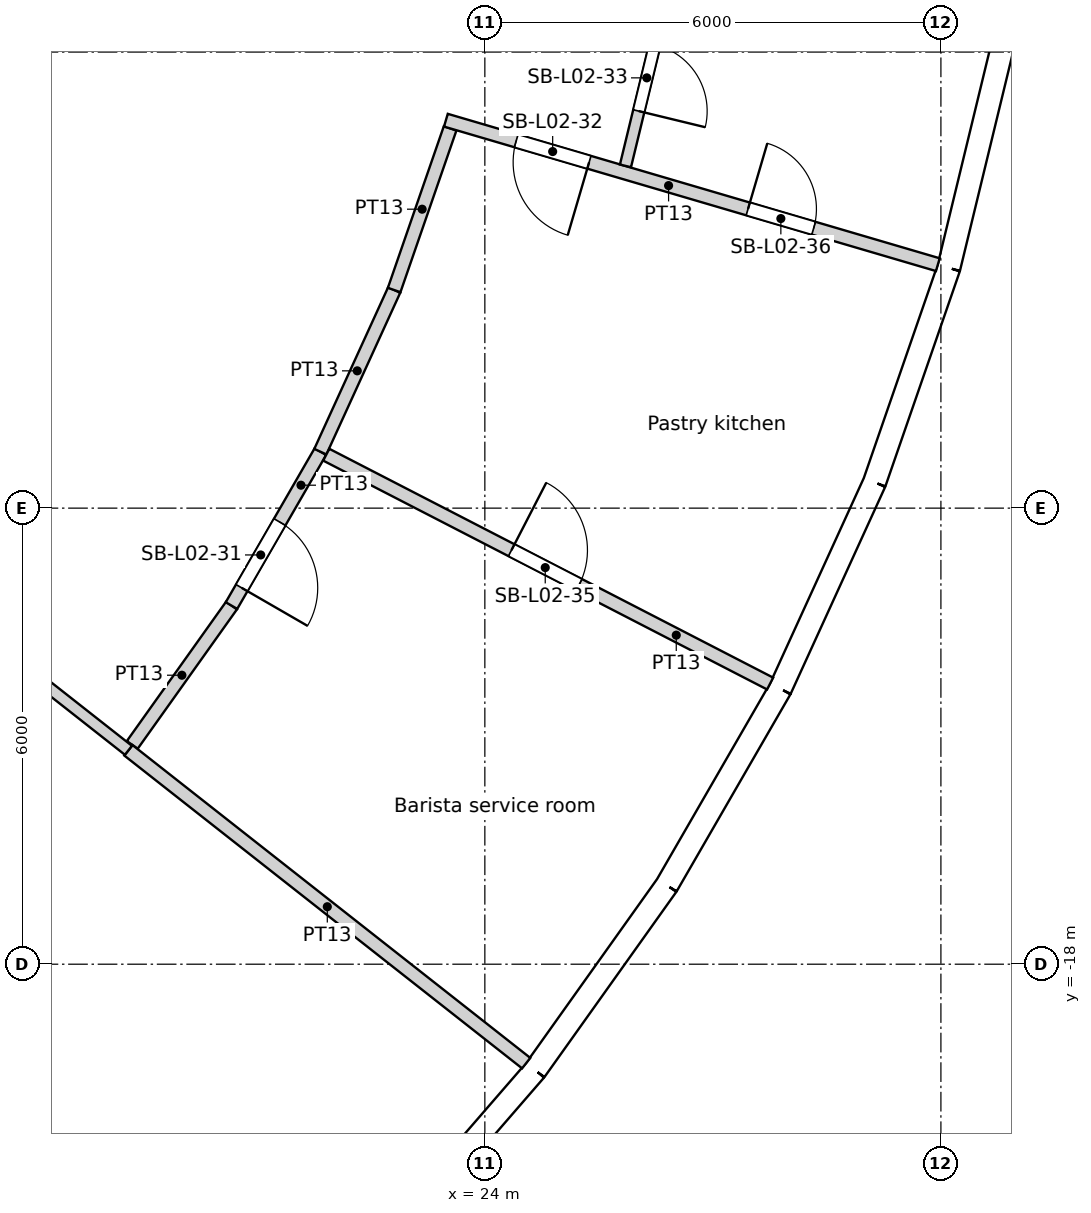
"""IFC4 building model, lengths in metres.
Left out: names, types, materials, properties, quantities, classifications, styles, units other than length and angle.
Written with IfcOpenShell. Run it as: python <this file> out.ifc"""

import sys

from ifc_helpers import new_model, si_unit, direction, frame, frame_2d, origin, origin_2d, place, context, subcontext, project, spatial, rectangle, circle, extrude, element, fill, save


model = new_model("IFC4")
c1 = context("Model", 3, precision=1e-05, world=origin(), true_north=direction((0.0, 1.0)))
c2 = subcontext(c1, "Body", "Model", "MODEL_VIEW")
j1 = project(units=[si_unit("LENGTHUNIT", "METRE"), si_unit("PLANEANGLEUNIT", "RADIAN")], contexts=[c1])
p1 = place(None, origin())
s1 = spatial("IfcSite", under=j1, at=p1, CompositionType="ELEMENT")
p2 = place(p1, origin())
s2 = spatial("IfcBuilding", under=s1, at=p2, CompositionType="ELEMENT")
p3 = place(p2, frame((0.0, 0.0, 13.8)))
s3 = spatial("IfcBuildingStorey", under=s2, at=p3, CompositionType="ELEMENT", Elevation=13.8)
for number, where, z_axis, x_axis in (
    (1, (21.911, -20.892, 0.0), (0.0, 0.0, 1.0), (1.0, 0.0, 0.0)),
    (2, (25.469, -16.368, 0.0), (0.0, 0.0, 1.0), (1.0, 0.0, 0.0)),
    (3, (28.106, -11.252, 0.0), (0.0, 0.0, 1.0), (1.0, 0.0, 0.0)),
    (4, (29.728, -5.729, 0.0), (0.0, 0.0, 1.0), (1.0, 0.0, 0.0)),
):
    element("IfcColumn", number, at=place(p3, frame(where, z_axis=z_axis, x_axis=x_axis)), inside=s3, PredefinedType="COLUMN", context=c2, shape_type="SweptSolid", body=[
        extrude(circle(Radius=0.7, at=origin_2d()), origin(), (0.0, 0.0, 1.0), 4.8),
    ])
for number, where, z_axis, x_axis in (
    (5, (18.805, -15.779, 0.0), (0.0, 0.0, 1.0), (1.0, 0.0, 0.0)),
    (6, (21.937, -11.017, 0.0), (0.0, 0.0, 1.0), (1.0, 0.0, 0.0)),
    (7, (23.886, -5.661, 0.0), (0.0, 0.0, 1.0), (1.0, 0.0, 0.0)),
):
    element("IfcColumn", number, at=place(p3, frame(where, z_axis=z_axis, x_axis=x_axis)), inside=s3, PredefinedType="COLUMN", context=c2, shape_type="SweptSolid", body=[
        extrude(circle(Radius=0.75, at=origin_2d()), origin(), (0.0, 0.0, 1.0), 4.8),
    ])
p4 = place(p3, frame((17.986, -5.548, 0.0), z_axis=(0.0, 0.0, 1.0), x_axis=(1.0, 0.0, 0.0)))
e8 = element("IfcColumn", 8, at=p4, inside=s3, PredefinedType="COLUMN", context=c2, shape_type="SweptSolid", body=[
    extrude(circle(Radius=0.8, at=origin_2d()), origin(), (0.0, 0.0, 1.0), 4.8),
])
p5 = place(p3, frame((22.707, -21.651, 0.0), z_axis=(0.0, 0.0, 1.0), x_axis=(0.654809121128, 0.755794294029, 0.0)))
e9 = element("IfcWall", 9, at=p5, inside=s3, PredefinedType="SOLIDWALL", context=c2, shape_type="SweptSolid", body=[
    extrude(rectangle(XDim=2.986, YDim=0.3, at=frame_2d((1.493, 0.0))), origin(), (0.0, 0.0, 1.0), 4.35),
])
p6 = place(p5, frame((1.493, 0.0, 2.0)))
e10 = element("IfcOpeningElement", 10, at=p6, cuts=e9, PredefinedType="OPENING", context=c2, shape_type="SweptSolid", body=[
    extrude(circle(Radius=1.2, at=origin_2d()), frame((0.0, 0.16, 0.0), z_axis=(0.0, -1.0, 0.0), x_axis=(1.0, 0.0, 0.0)), (0.0, 0.0, 1.0), 0.32),
])
p7 = place(p3, frame((24.662, -19.394, 0.0), z_axis=(0.0, 0.0, 1.0), x_axis=(0.580100533892, 0.814544885551, 0.0)))
e11 = element("IfcWall", 11, at=p7, inside=s3, PredefinedType="SOLIDWALL", context=c2, shape_type="SweptSolid", body=[
    extrude(rectangle(XDim=2.986, YDim=0.3, at=frame_2d((1.493, 0.0))), origin(), (0.0, 0.0, 1.0), 4.35),
])
p8 = place(p7, frame((1.493, 0.0, 2.0)))
e12 = element("IfcOpeningElement", 12, at=p8, cuts=e11, PredefinedType="OPENING", context=c2, shape_type="SweptSolid", body=[
    extrude(circle(Radius=1.2, at=origin_2d()), frame((0.0, 0.16, 0.0), z_axis=(0.0, -1.0, 0.0), x_axis=(1.0, 0.0, 0.0)), (0.0, 0.0, 1.0), 0.32),
])
p9 = place(p3, frame((26.394, -16.962, 0.0), z_axis=(0.0, 0.0, 1.0), x_axis=(0.500017373705, 0.866015372839, 0.0)))
e13 = element("IfcWall", 13, at=p9, inside=s3, PredefinedType="SOLIDWALL", context=c2, shape_type="SweptSolid", body=[
    extrude(rectangle(XDim=2.986, YDim=0.3, at=frame_2d((1.493, 0.0))), origin(), (0.0, 0.0, 1.0), 4.35),
])
p10 = place(p9, frame((1.493, 0.0, 2.0)))
e14 = element("IfcOpeningElement", 14, at=p10, cuts=e13, PredefinedType="OPENING", context=c2, shape_type="SweptSolid", body=[
    extrude(circle(Radius=1.2, at=origin_2d()), frame((0.0, 0.16, 0.0), z_axis=(0.0, -1.0, 0.0), x_axis=(1.0, 0.0, 0.0)), (0.0, 0.0, 1.0), 0.32),
])
p11 = place(p3, frame((27.887, -14.377, 0.0), z_axis=(0.0, 0.0, 1.0), x_axis=(0.415373250944, 0.909651066289, 0.0)))
e15 = element("IfcWall", 15, at=p11, inside=s3, PredefinedType="SOLIDWALL", context=c2, shape_type="SweptSolid", body=[
    extrude(rectangle(XDim=2.986, YDim=0.3, at=frame_2d((1.493, 0.0))), origin(), (0.0, 0.0, 1.0), 4.35),
])
p12 = place(p11, frame((1.493, 0.0, 2.0)))
e16 = element("IfcOpeningElement", 16, at=p12, cuts=e15, PredefinedType="OPENING", context=c2, shape_type="SweptSolid", body=[
    extrude(circle(Radius=1.2, at=origin_2d()), frame((0.0, 0.16, 0.0), z_axis=(0.0, -1.0, 0.0), x_axis=(1.0, 0.0, 0.0)), (0.0, 0.0, 1.0), 0.32),
])
p13 = place(p3, frame((29.127, -11.661, 0.0), z_axis=(0.0, 0.0, 1.0), x_axis=(0.327074054052, 0.944998710669, 0.0)))
e17 = element("IfcWall", 17, at=p13, inside=s3, PredefinedType="SOLIDWALL", context=c2, shape_type="SweptSolid", body=[
    extrude(rectangle(XDim=2.986, YDim=0.3, at=frame_2d((1.493, 0.0))), origin(), (0.0, 0.0, 1.0), 4.35),
])
p14 = place(p13, frame((1.493, 0.0, 2.0)))
e18 = element("IfcOpeningElement", 18, at=p14, cuts=e17, PredefinedType="OPENING", context=c2, shape_type="SweptSolid", body=[
    extrude(circle(Radius=1.2, at=origin_2d()), frame((0.0, 0.16, 0.0), z_axis=(0.0, -1.0, 0.0), x_axis=(1.0, 0.0, 0.0)), (0.0, 0.0, 1.0), 0.32),
])
p15 = place(p3, frame((30.104, -8.839, 0.0), z_axis=(0.0, 0.0, 1.0), x_axis=(0.235756834479, 0.971812078026, 0.0)))
e19 = element("IfcWall", 19, at=p15, inside=s3, PredefinedType="SOLIDWALL", context=c2, shape_type="SweptSolid", body=[
    extrude(rectangle(XDim=2.986, YDim=0.3, at=frame_2d((1.493, 0.0))), origin(), (0.0, 0.0, 1.0), 4.35),
])
p16 = place(p15, frame((1.493, 0.0, 2.0)))
e20 = element("IfcOpeningElement", 20, at=p16, cuts=e19, PredefinedType="OPENING", context=c2, shape_type="SweptSolid", body=[
    extrude(circle(Radius=1.2, at=origin_2d()), frame((0.0, 0.16, 0.0), z_axis=(0.0, -1.0, 0.0), x_axis=(1.0, 0.0, 0.0)), (0.0, 0.0, 1.0), 0.32),
])
p17 = place(p3, frame((19.311, -15.186, 0.0), z_axis=(0.0, 0.0, 1.0), x_axis=(-0.786062647167, 0.618146839131, 0.0)))
e21 = element("IfcWall", 21, at=p17, inside=s3, PredefinedType="PARTITIONING", context=c2, shape_type="SweptSolid", body=[
    extrude(rectangle(XDim=4.507, YDim=0.15, at=frame_2d((2.254, 0.0))), origin(), (0.0, 0.0, 1.0), 3.75),
])
p18 = place(p3, frame((19.362, -15.115, 0.0), z_axis=(0.0, 0.0, 1.0), x_axis=(0.580026485713, 0.814597615925, 0.0)))
e22 = element("IfcWall", 22, at=p18, inside=s3, PredefinedType="PARTITIONING", context=c2, shape_type="SweptSolid", body=[
    extrude(rectangle(XDim=2.25, YDim=0.175, at=frame_2d((1.125, 0.0))), origin(), (0.0, 0.0, 1.0), 3.75),
])
p19 = place(p3, frame((21.836, -11.257, 0.0), z_axis=(0.0, 0.0, 1.0), x_axis=(-0.500002679963, -0.866023856502, 0.0)))
e23 = element("IfcWall", 23, at=p19, inside=s3, PredefinedType="PARTITIONING", context=c2, shape_type="SweptSolid", body=[
    extrude(rectangle(XDim=2.338, YDim=0.175, at=frame_2d((1.169, 0.0))), origin(), (0.0, 0.0, 1.0), 3.75),
])
p20 = place(p19, frame((1.069, 0.0, 0.0)))
e24 = element("IfcOpeningElement", 24, at=p20, cuts=e23, PredefinedType="OPENING", context=c2, shape_type="SweptSolid", body=[
    extrude(rectangle(XDim=1.0, YDim=2.1, at=frame_2d((0.5, 1.05))), frame((0.0, 0.087, 0.0), z_axis=(0.0, -1.0, 0.0), x_axis=(1.0, 0.0, 0.0)), (0.0, 0.0, 1.0), 0.175),
])
p21 = place(p3, frame((21.836, -11.257, 0.0), z_axis=(0.0, 0.0, 1.0), x_axis=(0.415438886862, 0.909621092149, 0.0)))
e25 = element("IfcWall", 25, at=p21, inside=s3, PredefinedType="PARTITIONING", context=c2, shape_type="SweptSolid", body=[
    extrude(rectangle(XDim=2.338, YDim=0.175, at=frame_2d((1.169, 0.0))), origin(), (0.0, 0.0, 1.0), 3.75),
])
p22 = place(p3, frame((22.807, -9.131, 0.0), z_axis=(0.0, 0.0, 1.0), x_axis=(0.327077029882, 0.944997680697, 0.0)))
e26 = element("IfcWall", 26, at=p22, inside=s3, PredefinedType="PARTITIONING", context=c2, shape_type="SweptSolid", body=[
    extrude(rectangle(XDim=2.25, YDim=0.175, at=frame_2d((1.125, 0.0))), origin(), (0.0, 0.0, 1.0), 3.75),
])
p23 = place(p3, frame((24.544, -19.302, 0.0), z_axis=(0.0, 0.0, 1.0), x_axis=(-0.786047220166, 0.618166456279, 0.0)))
e27 = element("IfcWall", 27, at=p23, inside=s3, PredefinedType="PARTITIONING", context=c2, shape_type="SweptSolid", body=[
    extrude(rectangle(XDim=6.657, YDim=0.175, at=frame_2d((3.329, 0.0))), origin(), (0.0, 0.0, 1.0), 3.75),
])
p24 = place(p3, frame((26.433, -5.094, 0.0), z_axis=(0.0, 0.0, 1.0), x_axis=(-0.235698938428, -0.971826121497, 0.0)))
e28 = element("IfcWall", 28, at=p24, inside=s3, PredefinedType="PARTITIONING", context=c2, shape_type="SweptSolid", body=[
    extrude(rectangle(XDim=2.472, YDim=0.15, at=frame_2d((1.236, 0.0))), origin(), (0.0, 0.0, 1.0), 3.75),
])
p25 = place(p24, frame((0.831, 0.0, 0.0)))
e29 = element("IfcOpeningElement", 29, at=p25, cuts=e28, PredefinedType="OPENING", context=c2, shape_type="SweptSolid", body=[
    extrude(rectangle(XDim=0.9, YDim=2.1, at=frame_2d((0.45, 1.05))), frame((0.0, 0.075, 0.0), z_axis=(0.0, -1.0, 0.0), x_axis=(1.0, 0.0, 0.0)), (0.0, 0.0, 1.0), 0.15),
])
p26 = place(p3, frame((27.753, -14.308, 0.0), z_axis=(0.0, 0.0, 1.0), x_axis=(-0.888814046661, 0.458268033424, 0.0)))
e30 = element("IfcWall", 30, at=p26, inside=s3, PredefinedType="PARTITIONING", context=c2, shape_type="SweptSolid", body=[
    extrude(rectangle(XDim=6.57, YDim=0.175, at=frame_2d((3.285, 0.0))), origin(), (0.0, 0.0, 1.0), 3.75),
])
p27 = place(p26, frame((2.829, 0.0, 0.0)))
e31 = element("IfcOpeningElement", 31, at=p27, cuts=e30, PredefinedType="OPENING", context=c2, shape_type="SweptSolid", body=[
    extrude(rectangle(XDim=1.0, YDim=2.1, at=frame_2d((0.5, 1.05))), frame((0.0, 0.087, 0.0), z_axis=(0.0, -1.0, 0.0), x_axis=(1.0, 0.0, 0.0)), (0.0, 0.0, 1.0), 0.175),
])
p28 = place(p3, frame((29.959, -8.797, 0.0), z_axis=(0.0, 0.0, 1.0), x_axis=(-0.959490475678, 0.281741063891, 0.0)))
e32 = element("IfcWall", 32, at=p28, inside=s3, PredefinedType="PARTITIONING", context=c2, shape_type="SweptSolid", body=[
    extrude(rectangle(XDim=6.745, YDim=0.175, at=frame_2d((3.373, 0.0))), origin(), (0.0, 0.0, 1.0), 3.75),
])
p29 = place(p28, frame((4.781, 0.0, 0.0)))
e33 = element("IfcOpeningElement", 33, at=p29, cuts=e32, PredefinedType="OPENING", context=c2, shape_type="SweptSolid", body=[
    extrude(rectangle(XDim=1.0, YDim=2.1, at=frame_2d((0.5, 1.05))), frame((0.0, 0.087, 0.0), z_axis=(0.0, -1.0, 0.0), x_axis=(1.0, 0.0, 0.0)), (0.0, 0.0, 1.0), 0.175),
])
p30 = place(p28, frame((1.702, 0.0, 0.0)))
e34 = element("IfcOpeningElement", 34, at=p30, cuts=e32, PredefinedType="OPENING", context=c2, shape_type="SweptSolid", body=[
    extrude(rectangle(XDim=0.9, YDim=2.1, at=frame_2d((0.45, 1.05))), frame((0.0, 0.087, 0.0), z_axis=(0.0, -1.0, 0.0), x_axis=(1.0, 0.0, 0.0)), (0.0, 0.0, 1.0), 0.175),
])
p31 = place(p6, origin())
e35 = element("IfcWindow", 35, at=p31, inside=s3, PartitioningType="SINGLE_PANEL", PredefinedType="WINDOW", context=c2, shape_type="SweptSolid", body=[
    extrude(circle(Radius=1.2, at=origin_2d()), frame((0.0, 0.12, 0.0), z_axis=(0.0, -1.0, 0.0), x_axis=(1.0, 0.0, 0.0)), (0.0, 0.0, 1.0), 0.1),
])
fill(e10, e35)
p32 = place(p8, origin())
e36 = element("IfcWindow", 36, at=p32, inside=s3, PartitioningType="SINGLE_PANEL", PredefinedType="WINDOW", context=c2, shape_type="SweptSolid", body=[
    extrude(circle(Radius=1.2, at=origin_2d()), frame((0.0, 0.12, 0.0), z_axis=(0.0, -1.0, 0.0), x_axis=(1.0, 0.0, 0.0)), (0.0, 0.0, 1.0), 0.1),
])
fill(e12, e36)
p33 = place(p10, origin())
e37 = element("IfcWindow", 37, at=p33, inside=s3, PartitioningType="SINGLE_PANEL", PredefinedType="WINDOW", context=c2, shape_type="SweptSolid", body=[
    extrude(circle(Radius=1.2, at=origin_2d()), frame((0.0, 0.12, 0.0), z_axis=(0.0, -1.0, 0.0), x_axis=(1.0, 0.0, 0.0)), (0.0, 0.0, 1.0), 0.1),
])
fill(e14, e37)
p34 = place(p12, origin())
e38 = element("IfcWindow", 38, at=p34, inside=s3, PartitioningType="SINGLE_PANEL", PredefinedType="WINDOW", context=c2, shape_type="SweptSolid", body=[
    extrude(circle(Radius=1.2, at=origin_2d()), frame((0.0, 0.12, 0.0), z_axis=(0.0, -1.0, 0.0), x_axis=(1.0, 0.0, 0.0)), (0.0, 0.0, 1.0), 0.1),
])
fill(e16, e38)
p35 = place(p14, origin())
e39 = element("IfcWindow", 39, at=p35, inside=s3, PartitioningType="SINGLE_PANEL", PredefinedType="WINDOW", context=c2, shape_type="SweptSolid", body=[
    extrude(circle(Radius=1.2, at=origin_2d()), frame((0.0, 0.12, 0.0), z_axis=(0.0, -1.0, 0.0), x_axis=(1.0, 0.0, 0.0)), (0.0, 0.0, 1.0), 0.1),
])
fill(e18, e39)
p36 = place(p16, origin())
e40 = element("IfcWindow", 40, at=p36, inside=s3, PartitioningType="SINGLE_PANEL", PredefinedType="WINDOW", context=c2, shape_type="SweptSolid", body=[
    extrude(circle(Radius=1.2, at=origin_2d()), frame((0.0, 0.12, 0.0), z_axis=(0.0, -1.0, 0.0), x_axis=(1.0, 0.0, 0.0)), (0.0, 0.0, 1.0), 0.1),
])
fill(e20, e40)
p37 = place(p20, origin())
e41 = element("IfcDoor", 41, at=p37, inside=s3, OperationType="SINGLE_SWING_RIGHT", PredefinedType="DOOR", context=c2, shape_type="SweptSolid", body=[
    extrude(rectangle(XDim=1.0, YDim=2.1, at=frame_2d((0.5, 1.05))), frame((0.0, 0.025, 0.0), z_axis=(0.0, -1.0, 0.0), x_axis=(1.0, 0.0, 0.0)), (0.0, 0.0, 1.0), 0.05),
])
fill(e24, e41)
p38 = place(p29, origin())
e42 = element("IfcDoor", 42, at=p38, inside=s3, OperationType="SINGLE_SWING_LEFT", PredefinedType="DOOR", context=c2, shape_type="SweptSolid", body=[
    extrude(rectangle(XDim=1.0, YDim=2.1, at=frame_2d((0.5, 1.05))), frame((0.0, 0.025, 0.0), z_axis=(0.0, -1.0, 0.0), x_axis=(1.0, 0.0, 0.0)), (0.0, 0.0, 1.0), 0.05),
])
fill(e33, e42)
p39 = place(p25, origin())
e43 = element("IfcDoor", 43, at=p39, inside=s3, OperationType="SINGLE_SWING_RIGHT", PredefinedType="DOOR", context=c2, shape_type="SweptSolid", body=[
    extrude(rectangle(XDim=0.9, YDim=2.1, at=frame_2d((0.45, 1.05))), frame((0.0, 0.025, 0.0), z_axis=(0.0, -1.0, 0.0), x_axis=(1.0, 0.0, 0.0)), (0.0, 0.0, 1.0), 0.05),
])
fill(e29, e43)
p40 = place(p27, origin())
e44 = element("IfcDoor", 44, at=p40, inside=s3, OperationType="SINGLE_SWING_LEFT", PredefinedType="DOOR", context=c2, shape_type="SweptSolid", body=[
    extrude(rectangle(XDim=1.0, YDim=2.1, at=frame_2d((0.5, 1.05))), frame((0.0, 0.025, 0.0), z_axis=(0.0, -1.0, 0.0), x_axis=(1.0, 0.0, 0.0)), (0.0, 0.0, 1.0), 0.05),
])
fill(e31, e44)
p41 = place(p30, origin())
e45 = element("IfcDoor", 45, at=p41, inside=s3, OperationType="SINGLE_SWING_LEFT", PredefinedType="DOOR", context=c2, shape_type="SweptSolid", body=[
    extrude(rectangle(XDim=0.9, YDim=2.1, at=frame_2d((0.45, 1.05))), frame((0.0, 0.025, 0.0), z_axis=(0.0, -1.0, 0.0), x_axis=(1.0, 0.0, 0.0)), (0.0, 0.0, 1.0), 0.05),
])
fill(e34, e45)
save(model, sys.argv[1])
